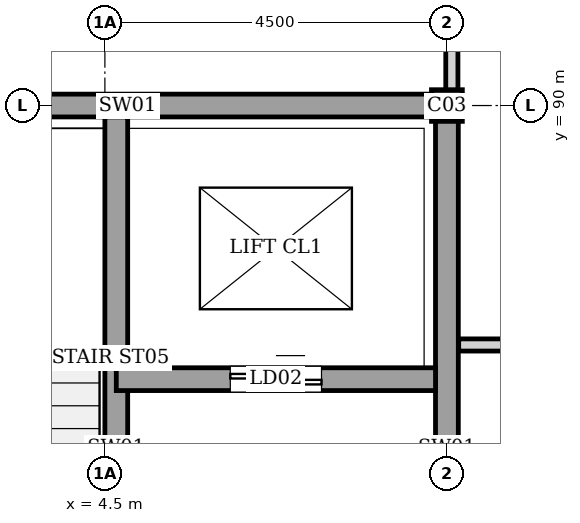
"""IFC4 building model, lengths in metres.
Left out: names, types, materials, properties, quantities, classifications, styles, units other than length and angle.
Written with IfcOpenShell. Run it as: python <this file> out.ifc"""

import sys

from ifc_helpers import new_model, si_unit, direction, frame, frame_2d, origin, origin_2d, place, context, subcontext, project, spatial, rectangle, i_section, extrude, element, fill, save


model = new_model("IFC4")
c1 = context("Model", 3, precision=1e-05, world=origin(), true_north=direction((0.0, 1.0)))
c2 = subcontext(c1, "Body", "Model", "MODEL_VIEW")
j1 = project(units=[si_unit("LENGTHUNIT", "METRE"), si_unit("PLANEANGLEUNIT", "RADIAN")], contexts=[c1])
p1 = place(None, origin())
s1 = spatial("IfcSite", under=j1, at=p1, CompositionType="ELEMENT")
p2 = place(p1, origin())
s2 = spatial("IfcBuilding", under=s1, at=p2, CompositionType="ELEMENT")
p3 = place(p2, frame((0.0, 0.0, 4.32)))
s3 = spatial("IfcBuildingStorey", under=s2, at=p3, CompositionType="ELEMENT", Elevation=4.32)
p4 = place(p3, frame((9.0, 90.0, 0.0), z_axis=(0.0, 0.0, 1.0), x_axis=(1.0, 0.0, 0.0)))
e1 = element("IfcColumn", 1, at=p4, inside=s3, PredefinedType="COLUMN", context=c2, shape_type="SweptSolid", body=[
    extrude(i_section(OverallWidth=0.406, OverallDepth=0.416, WebThickness=0.022, FlangeThickness=0.038, at=origin_2d()), origin(), (0.0, 0.0, 1.0), 3.84),
])
p5 = place(p3, frame((9.0, 81.0, 0.0), z_axis=(0.0, 0.0, 1.0), x_axis=(0.0, 1.0, 0.0)))
e2 = element("IfcWall", 2, at=p5, inside=s3, PredefinedType="SHEAR", context=c2, shape_type="SweptSolid", body=[
    extrude(rectangle(XDim=9.0, YDim=0.3, at=frame_2d((4.5, 0.0))), origin(), (0.0, 0.0, 1.0), 3.6),
])
p6 = place(p5, frame((2.05, 0.0, 0.0)))
e3 = element("IfcOpeningElement", 3, at=p6, cuts=e2, PredefinedType="OPENING", context=c2, shape_type="SweptSolid", body=[
    extrude(rectangle(XDim=1.4, YDim=2.02, at=frame_2d((0.7, 1.01))), frame((0.0, 0.16, 0.0), z_axis=(0.0, -1.0, 0.0), x_axis=(1.0, 0.0, 0.0)), (0.0, 0.0, 1.0), 0.32),
])
p7 = place(p3, frame((0.0, 90.0, 0.0), z_axis=(0.0, 0.0, 1.0), x_axis=(1.0, 0.0, 0.0)))
e4 = element("IfcWall", 4, at=p7, inside=s3, PredefinedType="SHEAR", context=c2, shape_type="SweptSolid", body=[
    extrude(rectangle(XDim=9.0, YDim=0.3, at=frame_2d((4.5, 0.0))), origin(), (0.0, 0.0, 1.0), 3.6),
])
p8 = place(p3, frame((4.65, 81.15, 0.0), z_axis=(0.0, 0.0, 1.0), x_axis=(0.0, 1.0, 0.0)))
e5 = element("IfcWall", 5, at=p8, inside=s3, PredefinedType="SHEAR", context=c2, shape_type="SweptSolid", body=[
    extrude(rectangle(XDim=8.7, YDim=0.3, at=frame_2d((4.35, 0.0))), origin(), (0.0, 0.0, 1.0), 3.6),
])
p9 = place(p8, frame((0.35, 0.0, 0.0)))
e6 = element("IfcOpeningElement", 6, at=p9, cuts=e5, PredefinedType="OPENING", context=c2, shape_type="SweptSolid", body=[
    extrude(rectangle(XDim=1.4, YDim=2.02, at=frame_2d((0.7, 1.01))), frame((0.0, 0.16, 0.0), z_axis=(0.0, -1.0, 0.0), x_axis=(1.0, 0.0, 0.0)), (0.0, 0.0, 1.0), 0.32),
])
p10 = place(p3, frame((4.65, 86.4, 0.0), z_axis=(0.0, 0.0, 1.0), x_axis=(1.0, 0.0, 0.0)))
e7 = element("IfcWall", 7, at=p10, inside=s3, PredefinedType="SHEAR", context=c2, shape_type="SweptSolid", body=[
    extrude(rectangle(XDim=4.2, YDim=0.3, at=frame_2d((2.1, 0.0))), origin(), (0.0, 0.0, 1.0), 3.6),
])
p11 = place(p10, frame((1.5, 0.0, 0.0)))
e8 = element("IfcOpeningElement", 8, at=p11, cuts=e7, PredefinedType="OPENING", context=c2, shape_type="SweptSolid", body=[
    extrude(rectangle(XDim=1.2, YDim=2.2, at=frame_2d((0.6, 1.1))), frame((0.0, 0.16, 0.0), z_axis=(0.0, -1.0, 0.0), x_axis=(1.0, 0.0, 0.0)), (0.0, 0.0, 1.0), 0.32),
])
p12 = place(p3, frame((9.155, 86.85, 0.0), z_axis=(0.0, 0.0, 1.0), x_axis=(1.0, 0.0, 0.0)))
e9 = element("IfcWall", 9, at=p12, inside=s3, PredefinedType="PARTITIONING", context=c2, shape_type="SweptSolid", body=[
    extrude(rectangle(XDim=2.775, YDim=0.16, at=frame_2d((1.387, 0.0))), origin(), (0.0, 0.0, 1.0), 3.6),
])
p13 = place(p12, frame((0.97, 0.0, 0.0)))
e10 = element("IfcOpeningElement", 10, at=p13, cuts=e9, PredefinedType="OPENING", context=c2, shape_type="SweptSolid", body=[
    extrude(rectangle(XDim=1.5, YDim=2.1, at=frame_2d((0.75, 1.05))), frame((0.0, 0.09, 0.0), z_axis=(0.0, -1.0, 0.0), x_axis=(1.0, 0.0, 0.0)), (0.0, 0.0, 1.0), 0.18),
])
p14 = place(p3, frame((9.065, 90.155, 0.0), z_axis=(0.0, 0.0, 1.0), x_axis=(0.0, 1.0, 0.0)))
e11 = element("IfcWall", 11, at=p14, inside=s3, PredefinedType="PARTITIONING", context=c2, shape_type="SweptSolid", body=[
    extrude(rectangle(XDim=8.825, YDim=0.16, at=frame_2d((4.413, 0.0))), origin(), (0.0, 0.0, 1.0), 3.29),
])
p15 = place(p11, origin())
e12 = element("IfcDoor", 12, at=p15, inside=s3, OperationType="DOUBLE_DOOR_SLIDING", PredefinedType="DOOR", context=c2, shape_type="SweptSolid", body=[
    extrude(rectangle(XDim=1.2, YDim=2.2, at=frame_2d((0.6, 1.1))), frame((0.0, 0.025, 0.0), z_axis=(0.0, -1.0, 0.0), x_axis=(1.0, 0.0, 0.0)), (0.0, 0.0, 1.0), 0.05),
])
fill(e8, e12)
save(model, sys.argv[1])
